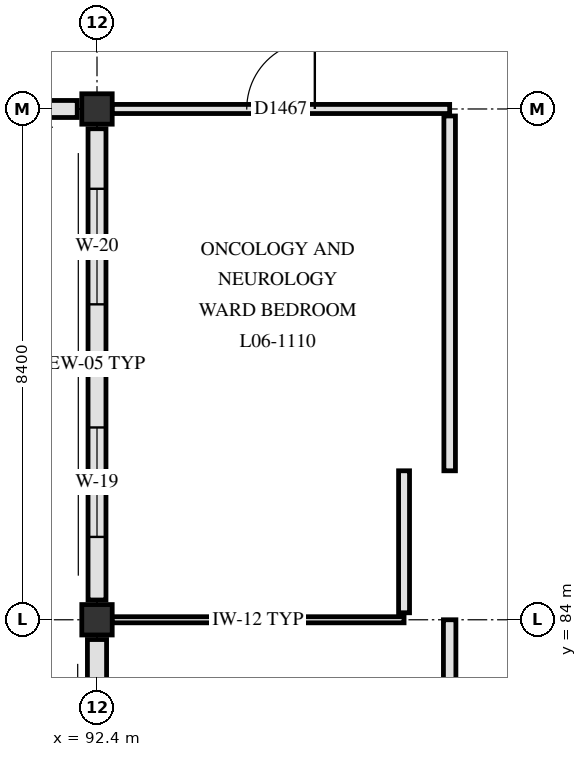
"""IFC4 building model, lengths in metres.
Left out: names, types, materials, properties, quantities, classifications, styles, units other than length and angle.
Written with IfcOpenShell. Run it as: python <this file> out.ifc"""

import sys

from ifc_helpers import new_model, si_unit, direction, frame, frame_2d, origin, origin_2d, place, context, subcontext, project, spatial, rectangle, extrude, element, fill, save


model = new_model("IFC4")
c1 = context("Model", 3, precision=1e-05, world=origin(), true_north=direction((0.0, 1.0)))
c2 = subcontext(c1, "Body", "Model", "MODEL_VIEW")
j1 = project(units=[si_unit("LENGTHUNIT", "METRE"), si_unit("PLANEANGLEUNIT", "RADIAN")], contexts=[c1])
p1 = place(None, origin())
s1 = spatial("IfcSite", under=j1, at=p1, CompositionType="ELEMENT")
p2 = place(p1, origin())
s2 = spatial("IfcBuilding", under=s1, at=p2, CompositionType="ELEMENT")
p3 = place(p2, frame((0.0, 0.0, 26.4)))
s3 = spatial("IfcBuildingStorey", under=s2, at=p3, CompositionType="ELEMENT", Elevation=26.4)
for number, where, z_axis, x_axis in (
    (1, (92.4, 84.0, 0.0), (0.0, 0.0, 1.0), (1.0, 0.0, 0.0)),
    (2, (92.4, 92.4, 0.0), (0.0, 0.0, 1.0), (1.0, 0.0, 0.0)),
):
    element("IfcColumn", number, at=place(p3, frame(where, z_axis=z_axis, x_axis=x_axis)), inside=s3, PredefinedType="COLUMN", context=c2, shape_type="SweptSolid", body=[
        extrude(rectangle(XDim=0.5, YDim=0.5, at=origin_2d()), origin(), (0.0, 0.0, 1.0), 3.9),
    ])
p4 = place(p3, frame((92.4, 75.925, 0.0), z_axis=(0.0, 0.0, 1.0), x_axis=(0.0, 1.0, 0.0)))
e3 = element("IfcWall", 3, at=p4, inside=s3, PredefinedType="SOLIDWALL", context=c2, shape_type="SweptSolid", body=[
    extrude(rectangle(XDim=7.75, YDim=0.315, at=frame_2d((3.875, 0.0))), origin(), (0.0, 0.0, 1.0), 3.34),
])
p5 = place(p4, frame((1.137, 0.0, 0.85)))
e4 = element("IfcOpeningElement", 4, at=p5, cuts=e3, PredefinedType="OPENING", context=c2, shape_type="SweptSolid", body=[
    extrude(rectangle(XDim=1.6, YDim=1.42, at=frame_2d((0.8, 0.71))), frame((0.0, 0.167, 0.0), z_axis=(0.0, -1.0, 0.0), x_axis=(1.0, 0.0, 0.0)), (0.0, 0.0, 1.0), 0.335),
])
p6 = place(p4, frame((4.962, 0.0, 0.85)))
e5 = element("IfcOpeningElement", 5, at=p6, cuts=e3, PredefinedType="OPENING", context=c2, shape_type="SweptSolid", body=[
    extrude(rectangle(XDim=1.7, YDim=1.42, at=frame_2d((0.85, 0.71))), frame((0.0, 0.167, 0.0), z_axis=(0.0, -1.0, 0.0), x_axis=(1.0, 0.0, 0.0)), (0.0, 0.0, 1.0), 0.335),
])
p7 = place(p3, frame((92.4, 84.325, 0.0), z_axis=(0.0, 0.0, 1.0), x_axis=(0.0, 1.0, 0.0)))
e6 = element("IfcWall", 6, at=p7, inside=s3, PredefinedType="SOLIDWALL", context=c2, shape_type="SweptSolid", body=[
    extrude(rectangle(XDim=7.75, YDim=0.295, at=frame_2d((3.875, 0.0))), origin(), (0.0, 0.0, 1.0), 3.34),
])
p8 = place(p7, frame((1.038, 0.0, 0.85)))
e7 = element("IfcOpeningElement", 7, at=p8, cuts=e6, PredefinedType="OPENING", context=c2, shape_type="SweptSolid", body=[
    extrude(rectangle(XDim=1.8, YDim=1.42, at=frame_2d((0.9, 0.71))), frame((0.0, 0.157, 0.0), z_axis=(0.0, -1.0, 0.0), x_axis=(1.0, 0.0, 0.0)), (0.0, 0.0, 1.0), 0.315),
])
p9 = place(p7, frame((4.863, 0.0, 0.85)))
e8 = element("IfcOpeningElement", 8, at=p9, cuts=e6, PredefinedType="OPENING", context=c2, shape_type="SweptSolid", body=[
    extrude(rectangle(XDim=1.9, YDim=1.42, at=frame_2d((0.95, 0.71))), frame((0.0, 0.157, 0.0), z_axis=(0.0, -1.0, 0.0), x_axis=(1.0, 0.0, 0.0)), (0.0, 0.0, 1.0), 0.315),
])
p10 = place(p3, frame((92.075, 92.4, 0.0), z_axis=(0.0, 0.0, 1.0), x_axis=(-1.0, 0.0, 0.0)))
e9 = element("IfcWall", 9, at=p10, inside=s3, PredefinedType="SOLIDWALL", context=c2, shape_type="SweptSolid", body=[
    extrude(rectangle(XDim=7.75, YDim=0.28, at=frame_2d((3.875, 0.0))), origin(), (0.0, 0.0, 1.0), 3.36),
])
p11 = place(p10, frame((1.413, 0.0, 0.85)))
e10 = element("IfcOpeningElement", 10, at=p11, cuts=e9, PredefinedType="OPENING", context=c2, shape_type="SweptSolid", body=[
    extrude(rectangle(XDim=1.05, YDim=1.54, at=frame_2d((0.525, 0.77))), frame((0.0, 0.15, 0.0), z_axis=(0.0, -1.0, 0.0), x_axis=(1.0, 0.0, 0.0)), (0.0, 0.0, 1.0), 0.3),
])
p12 = place(p10, frame((5.238, 0.0, 0.85)))
e11 = element("IfcOpeningElement", 11, at=p12, cuts=e9, PredefinedType="OPENING", context=c2, shape_type="SweptSolid", body=[
    extrude(rectangle(XDim=1.15, YDim=1.54, at=frame_2d((0.575, 0.77))), frame((0.0, 0.15, 0.0), z_axis=(0.0, -1.0, 0.0), x_axis=(1.0, 0.0, 0.0)), (0.0, 0.0, 1.0), 0.3),
])
p13 = place(p3, frame((92.645, 84.0, 0.0), z_axis=(0.0, 0.0, 1.0), x_axis=(1.0, 0.0, 0.0)))
e12 = element("IfcWall", 12, at=p13, inside=s3, PredefinedType="PARTITIONING", context=c2, shape_type="SweptSolid", body=[
    extrude(rectangle(XDim=4.805, YDim=0.1, at=frame_2d((2.402, 0.0))), origin(), (0.0, 0.0, 1.0), 3.21),
])
p14 = place(p3, frame((92.645, 92.4, 0.0), z_axis=(0.0, 0.0, 1.0), x_axis=(1.0, 0.0, 0.0)))
e13 = element("IfcWall", 13, at=p14, inside=s3, PredefinedType="PARTITIONING", context=c2, shape_type="SweptSolid", body=[
    extrude(rectangle(XDim=5.555, YDim=0.15, at=frame_2d((2.777, 0.0))), origin(), (0.0, 0.0, 1.0), 3.21),
])
p15 = place(p14, frame((2.218, 0.0, 0.0)))
e14 = element("IfcOpeningElement", 14, at=p15, cuts=e13, PredefinedType="OPENING", context=c2, shape_type="SweptSolid", body=[
    extrude(rectangle(XDim=1.12, YDim=2.18, at=frame_2d((0.56, 1.09))), frame((0.0, 0.085, 0.0), z_axis=(0.0, -1.0, 0.0), x_axis=(1.0, 0.0, 0.0)), (0.0, 0.0, 1.0), 0.17),
])
p16 = place(p3, frame((97.45, 84.115, 0.0), z_axis=(0.0, 0.0, 1.0), x_axis=(0.0, 1.0, 0.0)))
e15 = element("IfcWall", 15, at=p16, inside=s3, PredefinedType="PARTITIONING", context=c2, shape_type="SweptSolid", body=[
    extrude(rectangle(XDim=2.335, YDim=0.18, at=frame_2d((1.167, 0.0))), origin(), (0.0, 0.0, 1.0), 3.61),
])
p17 = place(p3, frame((98.2, 78.315, 0.0), z_axis=(0.0, 0.0, 1.0), x_axis=(0.0, 1.0, 0.0)))
e16 = element("IfcWall", 16, at=p17, inside=s3, PredefinedType="PARTITIONING", context=c2, shape_type="SweptSolid", body=[
    extrude(rectangle(XDim=5.685, YDim=0.205, at=frame_2d((2.843, 0.0))), origin(), (0.0, 0.0, 1.0), 3.21),
])
p18 = place(p3, frame((98.2, 86.45, 0.0), z_axis=(0.0, 0.0, 1.0), x_axis=(0.0, 1.0, 0.0)))
e17 = element("IfcWall", 17, at=p18, inside=s3, PredefinedType="PARTITIONING", context=c2, shape_type="SweptSolid", body=[
    extrude(rectangle(XDim=5.835, YDim=0.19, at=frame_2d((2.917, 0.0))), origin(), (0.0, 0.0, 1.0), 3.34),
])
p19 = place(p8, origin())
e18 = element("IfcWindow", 18, at=p19, inside=s3, PartitioningType="SINGLE_PANEL", PredefinedType="WINDOW", context=c2, shape_type="SweptSolid", body=[
    extrude(rectangle(XDim=1.8, YDim=1.42, at=frame_2d((0.9, 0.71))), frame((0.0, 0.03, 0.0), z_axis=(0.0, -1.0, 0.0), x_axis=(1.0, 0.0, 0.0)), (0.0, 0.0, 1.0), 0.06),
])
fill(e7, e18)
p20 = place(p9, origin())
e19 = element("IfcWindow", 19, at=p20, inside=s3, PartitioningType="SINGLE_PANEL", PredefinedType="WINDOW", context=c2, shape_type="SweptSolid", body=[
    extrude(rectangle(XDim=1.9, YDim=1.42, at=frame_2d((0.95, 0.71))), frame((0.0, 0.03, 0.0), z_axis=(0.0, -1.0, 0.0), x_axis=(1.0, 0.0, 0.0)), (0.0, 0.0, 1.0), 0.06),
])
fill(e8, e19)
p21 = place(p15, origin())
e20 = element("IfcDoor", 20, at=p21, inside=s3, OperationType="SINGLE_SWING_RIGHT", PredefinedType="DOOR", context=c2, shape_type="SweptSolid", body=[
    extrude(rectangle(XDim=1.12, YDim=2.18, at=frame_2d((0.56, 1.09))), frame((0.0, 0.025, 0.0), z_axis=(0.0, -1.0, 0.0), x_axis=(1.0, 0.0, 0.0)), (0.0, 0.0, 1.0), 0.05),
])
fill(e14, e20)
save(model, sys.argv[1])
